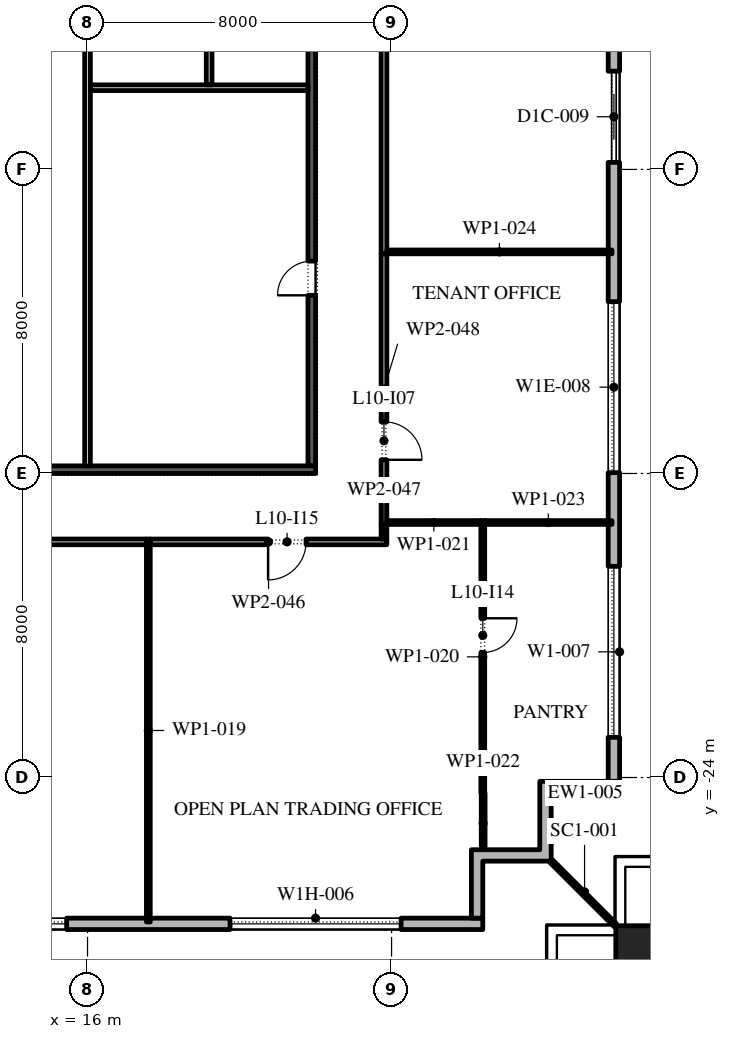
"""IFC4 building model, lengths in metres.
Left out: names, types, materials, properties, quantities, classifications, styles, units other than length and angle.
Written with IfcOpenShell. Run it as: python <this file> out.ifc"""

import sys

from ifc_helpers import new_model, si_unit, direction, frame, frame_2d, origin, origin_2d, place, context, subcontext, project, spatial, polyline, rectangle, outline, extrude, element, fill, save


model = new_model("IFC4")
c1 = context("Model", 3, precision=1e-05, world=origin(), true_north=direction((0.0, 1.0)))
c2 = subcontext(c1, "Body", "Model", "MODEL_VIEW")
j1 = project(units=[si_unit("LENGTHUNIT", "METRE"), si_unit("PLANEANGLEUNIT", "RADIAN")], contexts=[c1])
p1 = place(None, origin())
s1 = spatial("IfcSite", under=j1, at=p1, CompositionType="ELEMENT")
p2 = place(p1, origin())
s2 = spatial("IfcBuilding", under=s1, at=p2, CompositionType="ELEMENT")
p3 = place(p2, frame((0.0, 0.0, 52.2)))
s3 = spatial("IfcBuildingStorey", under=s2, at=p3, CompositionType="ELEMENT", Elevation=52.2)
p4 = place(p3, frame((30.6, -28.6, 0.0), z_axis=(0.0, 0.0, 1.0), x_axis=(1.0, 0.0, 0.0)))
e1 = element("IfcColumn", 1, at=p4, inside=s3, PredefinedType="COLUMN", context=c2, shape_type="SweptSolid", body=[
    extrude(rectangle(XDim=1.4, YDim=1.4, at=origin_2d()), origin(), (0.0, 0.0, 1.0), 4.2),
])
p5 = place(p3, frame((-26.1, -27.85, 0.0), z_axis=(0.0, 0.0, 1.0), x_axis=(1.0, 0.0, 0.0)))
e2 = element("IfcWall", 2, at=p5, inside=s3, PredefinedType="STANDARD", context=c2, shape_type="SweptSolid", body=[
    extrude(rectangle(XDim=52.5, YDim=0.3, at=frame_2d((26.25, 0.0))), origin(), (0.0, 0.0, 1.0), 4.0),
])
p6 = place(p5, frame((2.0, 0.0, 0.45)))
e3 = element("IfcOpeningElement", 3, at=p6, cuts=e2, PredefinedType="OPENING", context=c2, shape_type="SweptSolid", body=[
    extrude(rectangle(XDim=4.5, YDim=2.75, at=frame_2d((2.25, 1.375))), frame((0.0, 0.16, 0.0), z_axis=(0.0, -1.0, 0.0), x_axis=(1.0, 0.0, 0.0)), (0.0, 0.0, 1.0), 0.32),
])
p7 = place(p5, frame((10.65, 0.0, 0.45)))
e4 = element("IfcOpeningElement", 4, at=p7, cuts=e2, PredefinedType="OPENING", context=c2, shape_type="SweptSolid", body=[
    extrude(rectangle(XDim=4.5, YDim=2.75, at=frame_2d((2.25, 1.375))), frame((0.0, 0.16, 0.0), z_axis=(0.0, -1.0, 0.0), x_axis=(1.0, 0.0, 0.0)), (0.0, 0.0, 1.0), 0.32),
])
p8 = place(p5, frame((20.5, 0.0, 0.0)))
e5 = element("IfcOpeningElement", 5, at=p8, cuts=e2, PredefinedType="OPENING", context=c2, shape_type="SweptSolid", body=[
    extrude(rectangle(XDim=2.4, YDim=3.5, at=frame_2d((1.2, 1.75))), frame((0.0, 0.16, 0.0), z_axis=(0.0, -1.0, 0.0), x_axis=(1.0, 0.0, 0.0)), (0.0, 0.0, 1.0), 0.32),
])
p9 = place(p5, frame((28.25, 0.0, 0.45)))
e6 = element("IfcOpeningElement", 6, at=p9, cuts=e2, PredefinedType="OPENING", context=c2, shape_type="SweptSolid", body=[
    extrude(rectangle(XDim=4.5, YDim=2.75, at=frame_2d((2.25, 1.375))), frame((0.0, 0.16, 0.0), z_axis=(0.0, -1.0, 0.0), x_axis=(1.0, 0.0, 0.0)), (0.0, 0.0, 1.0), 0.32),
])
p10 = place(p5, frame((37.05, 0.0, 0.45)))
e7 = element("IfcOpeningElement", 7, at=p10, cuts=e2, PredefinedType="OPENING", context=c2, shape_type="SweptSolid", body=[
    extrude(rectangle(XDim=4.5, YDim=2.75, at=frame_2d((2.25, 1.375))), frame((0.0, 0.16, 0.0), z_axis=(0.0, -1.0, 0.0), x_axis=(1.0, 0.0, 0.0)), (0.0, 0.0, 1.0), 0.32),
])
p11 = place(p5, frame((45.85, 0.0, 0.45)))
e8 = element("IfcOpeningElement", 8, at=p11, cuts=e2, PredefinedType="OPENING", context=c2, shape_type="SweptSolid", body=[
    extrude(rectangle(XDim=4.5, YDim=2.75, at=frame_2d((2.25, 1.375))), frame((0.0, 0.16, 0.0), z_axis=(0.0, -1.0, 0.0), x_axis=(1.0, 0.0, 0.0)), (0.0, 0.0, 1.0), 0.32),
])
p12 = place(p3, frame((29.85, -24.1, 0.0), z_axis=(0.0, 0.0, 1.0), x_axis=(0.0, 1.0, 0.0)))
e9 = element("IfcWall", 9, at=p12, inside=s3, PredefinedType="STANDARD", context=c2, shape_type="SweptSolid", body=[
    extrude(rectangle(XDim=49.5, YDim=0.3, at=frame_2d((24.75, 0.0))), origin(), (0.0, 0.0, 1.0), 4.0),
])
p13 = place(p12, frame((1.157, 0.0, 0.45)))
e10 = element("IfcOpeningElement", 10, at=p13, cuts=e9, PredefinedType="OPENING", context=c2, shape_type="SweptSolid", body=[
    extrude(rectangle(XDim=4.5, YDim=3.05, at=frame_2d((2.25, 1.525))), frame((0.0, 0.16, 0.0), z_axis=(0.0, -1.0, 0.0), x_axis=(1.0, 0.0, 0.0)), (0.0, 0.0, 1.0), 0.32),
])
p14 = place(p12, frame((8.121, 0.0, 0.45)))
e11 = element("IfcOpeningElement", 11, at=p14, cuts=e9, PredefinedType="OPENING", context=c2, shape_type="SweptSolid", body=[
    extrude(rectangle(XDim=4.5, YDim=2.825, at=frame_2d((2.25, 1.413))), frame((0.0, 0.16, 0.0), z_axis=(0.0, -1.0, 0.0), x_axis=(1.0, 0.0, 0.0)), (0.0, 0.0, 1.0), 0.32),
])
p15 = place(p12, frame((16.286, 0.0, 0.0)))
e12 = element("IfcOpeningElement", 12, at=p15, cuts=e9, PredefinedType="OPENING", context=c2, shape_type="SweptSolid", body=[
    extrude(rectangle(XDim=2.4, YDim=3.325, at=frame_2d((1.2, 1.663))), frame((0.0, 0.16, 0.0), z_axis=(0.0, -1.0, 0.0), x_axis=(1.0, 0.0, 0.0)), (0.0, 0.0, 1.0), 0.32),
])
p16 = place(p12, frame((22.35, 0.0, 0.45)))
e13 = element("IfcOpeningElement", 13, at=p16, cuts=e9, PredefinedType="OPENING", context=c2, shape_type="SweptSolid", body=[
    extrude(rectangle(XDim=4.5, YDim=2.875, at=frame_2d((2.25, 1.438))), frame((0.0, 0.16, 0.0), z_axis=(0.0, -1.0, 0.0), x_axis=(1.0, 0.0, 0.0)), (0.0, 0.0, 1.0), 0.32),
])
p17 = place(p12, frame((29.464, 0.0, 0.45)))
e14 = element("IfcOpeningElement", 14, at=p17, cuts=e9, PredefinedType="OPENING", context=c2, shape_type="SweptSolid", body=[
    extrude(rectangle(XDim=4.5, YDim=2.875, at=frame_2d((2.25, 1.438))), frame((0.0, 0.16, 0.0), z_axis=(0.0, -1.0, 0.0), x_axis=(1.0, 0.0, 0.0)), (0.0, 0.0, 1.0), 0.32),
])
p18 = place(p12, frame((36.579, 0.0, 0.45)))
e15 = element("IfcOpeningElement", 15, at=p18, cuts=e9, PredefinedType="OPENING", context=c2, shape_type="SweptSolid", body=[
    extrude(rectangle(XDim=4.5, YDim=3.05, at=frame_2d((2.25, 1.525))), frame((0.0, 0.16, 0.0), z_axis=(0.0, -1.0, 0.0), x_axis=(1.0, 0.0, 0.0)), (0.0, 0.0, 1.0), 0.32),
])
p19 = place(p12, frame((44.743, 0.0, 0.0)))
e16 = element("IfcOpeningElement", 16, at=p19, cuts=e9, PredefinedType="OPENING", context=c2, shape_type="SweptSolid", body=[
    extrude(rectangle(XDim=2.4, YDim=3.325, at=frame_2d((1.2, 1.663))), frame((0.0, 0.16, 0.0), z_axis=(0.0, -1.0, 0.0), x_axis=(1.0, 0.0, 0.0)), (0.0, 0.0, 1.0), 0.32),
])
p20 = place(p3, origin())
e17 = element("IfcWall", 17, at=p20, inside=s3, PredefinedType="STANDARD", context=c2, shape_type="SweptSolid", body=[
    extrude(outline(polyline([(27.9, -25.9), (27.9, -24.1), (30.0, -24.1), (30.0, -24.4), (28.2, -24.4), (28.2, -26.2), (26.4, -26.2), (26.4, -27.7), (26.1, -27.7), (26.1, -25.9), (27.9, -25.9)])), origin(), (0.0, 0.0, 1.0), 4.0),
])
p21 = place(p3, frame((28.2, -26.2, -0.05), z_axis=(0.0, 0.0, 1.0), x_axis=(0.707106781187, -0.707106781187, 0.0)))
e18 = element("IfcWall", 18, at=p21, inside=s3, PredefinedType="STANDARD", context=c2, shape_type="SweptSolid", body=[
    extrude(rectangle(XDim=2.385, YDim=0.1, at=frame_2d((1.192, 0.0))), origin(), (0.0, 0.0, 1.0), 4.05),
])
p22 = place(p3, frame((21.9, -15.8, 0.0), z_axis=(0.0, 0.0, 1.0), x_axis=(0.0, 1.0, 0.0)))
e19 = element("IfcWall", 19, at=p22, inside=s3, PredefinedType="SHEAR", context=c2, shape_type="SweptSolid", body=[
    extrude(rectangle(XDim=13.05, YDim=0.2, at=frame_2d((6.525, 0.0))), origin(), (0.0, 0.0, 1.0), 4.0),
])
p23 = place(p22, frame((4.488, 0.0, 0.0)))
e20 = element("IfcOpeningElement", 20, at=p23, cuts=e19, PredefinedType="OPENING", context=c2, shape_type="SweptSolid", body=[
    extrude(rectangle(XDim=0.9, YDim=2.1, at=frame_2d((0.45, 1.05))), frame((0.0, 0.11, 0.0), z_axis=(0.0, -1.0, 0.0), x_axis=(1.0, 0.0, 0.0)), (0.0, 0.0, 1.0), 0.22),
])
p24 = place(p22, frame((11.038, 0.0, 0.0)))
e21 = element("IfcOpeningElement", 21, at=p24, cuts=e19, PredefinedType="OPENING", context=c2, shape_type="SweptSolid", body=[
    extrude(rectangle(XDim=1.0, YDim=2.1, at=frame_2d((0.5, 1.05))), frame((0.0, 0.11, 0.0), z_axis=(0.0, -1.0, 0.0), x_axis=(1.0, 0.0, 0.0)), (0.0, 0.0, 1.0), 0.22),
])
p25 = place(p3, frame((10.0, -15.9, 0.0), z_axis=(0.0, 0.0, 1.0), x_axis=(1.0, 0.0, 0.0)))
e22 = element("IfcWall", 22, at=p25, inside=s3, PredefinedType="SHEAR", context=c2, shape_type="SweptSolid", body=[
    extrude(rectangle(XDim=12.0, YDim=0.2, at=frame_2d((6.0, 0.0))), origin(), (0.0, 0.0, 1.0), 4.0),
])
p26 = place(p3, frame((16.0, -15.8, 0.0), z_axis=(0.0, 0.0, 1.0), x_axis=(0.0, 1.0, 0.0)))
e23 = element("IfcWall", 23, at=p26, inside=s3, PredefinedType="PARTITIONING", context=c2, shape_type="SweptSolid", body=[
    extrude(rectangle(XDim=13.05, YDim=0.15, at=frame_2d((6.525, 0.0))), origin(), (0.0, 0.0, 1.0), 4.0),
])
p27 = place(p26, frame((11.087, 0.0, 0.0)))
e24 = element("IfcOpeningElement", 24, at=p27, cuts=e23, PredefinedType="OPENING", context=c2, shape_type="SweptSolid", body=[
    extrude(rectangle(XDim=0.9, YDim=2.1, at=frame_2d((0.45, 1.05))), frame((0.0, 0.085, 0.0), z_axis=(0.0, -1.0, 0.0), x_axis=(1.0, 0.0, 0.0)), (0.0, 0.0, 1.0), 0.17),
])
p28 = place(p3, frame((16.075, -5.85, 0.0), z_axis=(0.0, 0.0, 1.0), x_axis=(1.0, 0.0, 0.0)))
e25 = element("IfcWall", 25, at=p28, inside=s3, PredefinedType="PARTITIONING", context=c2, shape_type="SweptSolid", body=[
    extrude(rectangle(XDim=5.725, YDim=0.15, at=frame_2d((2.863, 0.0))), origin(), (0.0, 0.0, 1.0), 4.0),
])
p29 = place(p3, frame((19.2, -5.775, 0.0), z_axis=(0.0, 0.0, 1.0), x_axis=(0.0, 1.0, 0.0)))
e26 = element("IfcWall", 26, at=p29, inside=s3, PredefinedType="PARTITIONING", context=c2, shape_type="SweptSolid", body=[
    extrude(rectangle(XDim=3.025, YDim=0.15, at=frame_2d((1.512, 0.0))), origin(), (0.0, 0.0, 1.0), 4.0),
])
p30 = place(p3, frame((17.6, -27.8, 0.0), z_axis=(0.0, 0.0, 1.0), x_axis=(0.0, 1.0, 0.0)))
e27 = element("IfcWall", 27, at=p30, inside=s3, PredefinedType="PARTITIONING", context=c2, shape_type="SweptSolid", body=[
    extrude(rectangle(XDim=10.075, YDim=0.1, at=frame_2d((5.038, 0.0))), origin(), (0.0, 0.0, 1.0), 4.0),
])
p31 = place(p3, frame((17.55, -17.8, 0.0), z_axis=(0.0, 0.0, 1.0), x_axis=(-1.0, 0.0, 0.0)))
e28 = element("IfcWall", 28, at=p31, inside=s3, PredefinedType="PARTITIONING", context=c2, shape_type="SweptSolid", body=[
    extrude(rectangle(XDim=8.7, YDim=0.15, at=frame_2d((4.35, 0.0))), origin(), (0.0, 0.0, 1.0), 4.0),
])
p32 = place(p31, frame((4.85, 0.0, 0.0)))
e29 = element("IfcOpeningElement", 29, at=p32, cuts=e28, PredefinedType="OPENING", context=c2, shape_type="SweptSolid", body=[
    extrude(rectangle(XDim=1.0, YDim=2.1, at=frame_2d((0.5, 1.05))), frame((0.0, 0.085, 0.0), z_axis=(0.0, -1.0, 0.0), x_axis=(1.0, 0.0, 0.0)), (0.0, 0.0, 1.0), 0.17),
])
p33 = place(p3, frame((23.875, -17.8, 0.0), z_axis=(0.0, 0.0, 1.0), x_axis=(-1.0, 0.0, 0.0)))
e30 = element("IfcWall", 30, at=p33, inside=s3, PredefinedType="PARTITIONING", context=c2, shape_type="SweptSolid", body=[
    extrude(rectangle(XDim=6.225, YDim=0.15, at=frame_2d((3.113, 0.0))), origin(), (0.0, 0.0, 1.0), 4.0),
])
p34 = place(p33, frame((2.125, 0.0, 0.0)))
e31 = element("IfcOpeningElement", 31, at=p34, cuts=e30, PredefinedType="OPENING", context=c2, shape_type="SweptSolid", body=[
    extrude(rectangle(XDim=1.0, YDim=2.1, at=frame_2d((0.5, 1.05))), frame((0.0, 0.085, 0.0), z_axis=(0.0, -1.0, 0.0), x_axis=(1.0, 0.0, 0.0)), (0.0, 0.0, 1.0), 0.17),
])
p35 = place(p3, frame((23.8, -17.34, 0.0), z_axis=(0.0, 0.0, 1.0), x_axis=(0.0, -1.0, 0.0)))
e32 = element("IfcWall", 32, at=p35, inside=s3, PredefinedType="PARTITIONING", context=c2, shape_type="SweptSolid", body=[
    extrude(rectangle(XDim=0.385, YDim=0.15, at=frame_2d((0.192, 0.0))), origin(), (0.0, 0.0, 1.0), 4.0),
])
p36 = place(p3, frame((23.8, -10.22, 0.0), z_axis=(0.0, 0.0, 1.0), x_axis=(0.0, -1.0, 0.0)))
e33 = element("IfcWall", 33, at=p36, inside=s3, PredefinedType="PARTITIONING", context=c2, shape_type="SweptSolid", body=[
    extrude(rectangle(XDim=7.12, YDim=0.15, at=frame_2d((3.56, 0.0))), origin(), (0.0, 0.0, 1.0), 4.0),
])
p37 = place(p36, frame((4.42, 0.0, 0.0)))
e34 = element("IfcOpeningElement", 34, at=p37, cuts=e33, PredefinedType="OPENING", context=c2, shape_type="SweptSolid", body=[
    extrude(rectangle(XDim=1.0, YDim=2.1, at=frame_2d((0.5, 1.05))), frame((0.0, 0.085, 0.0), z_axis=(0.0, -1.0, 0.0), x_axis=(1.0, 0.0, 0.0)), (0.0, 0.0, 1.0), 0.17),
])
p38 = place(p3, frame((23.8, 4.11, 0.0), z_axis=(0.0, 0.0, 1.0), x_axis=(0.0, -1.0, 0.0)))
e35 = element("IfcWall", 35, at=p38, inside=s3, PredefinedType="PARTITIONING", context=c2, shape_type="SweptSolid", body=[
    extrude(rectangle(XDim=14.33, YDim=0.15, at=frame_2d((7.165, 0.0))), origin(), (0.0, 0.0, 1.0), 4.0),
])
p39 = place(p38, frame((6.63, 0.0, 0.0)))
e36 = element("IfcOpeningElement", 36, at=p39, cuts=e35, PredefinedType="OPENING", context=c2, shape_type="SweptSolid", body=[
    extrude(rectangle(XDim=1.0, YDim=2.1, at=frame_2d((0.5, 1.05))), frame((0.0, 0.085, 0.0), z_axis=(0.0, -1.0, 0.0), x_axis=(1.0, 0.0, 0.0)), (0.0, 0.0, 1.0), 0.17),
])
p40 = place(p3, frame((26.4, -24.41, 0.0), z_axis=(0.0, 0.0, 1.0), x_axis=(0.0, 1.0, 0.0)))
e37 = element("IfcWall", 37, at=p40, inside=s3, PredefinedType="PARTITIONING", context=c2, shape_type="SweptSolid", body=[
    extrude(rectangle(XDim=7.17, YDim=0.1, at=frame_2d((3.585, 0.0))), origin(), (0.0, 0.0, 1.0), 4.0),
])
p41 = place(p40, frame((3.7, 0.0, 0.0)))
e38 = element("IfcOpeningElement", 38, at=p41, cuts=e37, PredefinedType="OPENING", context=c2, shape_type="SweptSolid", body=[
    extrude(rectangle(XDim=0.9, YDim=2.1, at=frame_2d((0.45, 1.05))), frame((0.0, 0.06, 0.0), z_axis=(0.0, -1.0, 0.0), x_axis=(1.0, 0.0, 0.0)), (0.0, 0.0, 1.0), 0.12),
])
p42 = place(p3, frame((26.35, -17.29, 0.0), z_axis=(0.0, 0.0, 1.0), x_axis=(-1.0, 0.0, 0.0)))
e39 = element("IfcWall", 39, at=p42, inside=s3, PredefinedType="PARTITIONING", context=c2, shape_type="SweptSolid", body=[
    extrude(rectangle(XDim=2.475, YDim=0.1, at=frame_2d((1.238, 0.0))), origin(), (0.0, 0.0, 1.0), 4.0),
])
p43 = place(p3, frame((26.41, -26.0, 0.0), z_axis=(0.0, 0.0, 1.0), x_axis=(0.0, 1.0, 0.0)))
e40 = element("IfcWall", 40, at=p43, inside=s3, PredefinedType="PARTITIONING", context=c2, shape_type="SweptSolid", body=[
    extrude(rectangle(XDim=1.59, YDim=0.1, at=frame_2d((0.795, 0.0))), origin(), (0.0, 0.0, 1.0), 4.0),
])
p44 = place(p3, frame((29.8, -17.29, 0.0), z_axis=(0.0, 0.0, 1.0), x_axis=(-1.0, 0.0, 0.0)))
e41 = element("IfcWall", 41, at=p44, inside=s3, PredefinedType="PARTITIONING", context=c2, shape_type="SweptSolid", body=[
    extrude(rectangle(XDim=3.35, YDim=0.1, at=frame_2d((1.675, 0.0))), origin(), (0.0, 0.0, 1.0), 4.0),
])
p45 = place(p3, frame((29.8, -10.17, 0.0), z_axis=(0.0, 0.0, 1.0), x_axis=(-1.0, 0.0, 0.0)))
e42 = element("IfcWall", 42, at=p45, inside=s3, PredefinedType="PARTITIONING", context=c2, shape_type="SweptSolid", body=[
    extrude(rectangle(XDim=5.925, YDim=0.1, at=frame_2d((2.962, 0.0))), origin(), (0.0, 0.0, 1.0), 4.0),
])
p46 = place(p10, origin())
e43 = element("IfcWindow", 43, at=p46, inside=s3, PartitioningType="DOUBLE_PANEL_VERTICAL", PredefinedType="WINDOW", context=c2, shape_type="SweptSolid", body=[
    extrude(rectangle(XDim=4.5, YDim=2.75, at=frame_2d((2.25, 1.375))), frame((0.0, 0.03, 0.0), z_axis=(0.0, -1.0, 0.0), x_axis=(1.0, 0.0, 0.0)), (0.0, 0.0, 1.0), 0.06),
])
fill(e7, e43)
p47 = place(p11, origin())
e44 = element("IfcWindow", 44, at=p47, inside=s3, PartitioningType="DOUBLE_PANEL_VERTICAL", PredefinedType="WINDOW", context=c2, shape_type="SweptSolid", body=[
    extrude(rectangle(XDim=4.5, YDim=2.75, at=frame_2d((2.25, 1.375))), frame((0.0, 0.03, 0.0), z_axis=(0.0, -1.0, 0.0), x_axis=(1.0, 0.0, 0.0)), (0.0, 0.0, 1.0), 0.06),
])
fill(e8, e44)
p48 = place(p13, origin())
e45 = element("IfcWindow", 45, at=p48, inside=s3, PartitioningType="DOUBLE_PANEL_VERTICAL", PredefinedType="WINDOW", context=c2, shape_type="SweptSolid", body=[
    extrude(rectangle(XDim=4.5, YDim=3.05, at=frame_2d((2.25, 1.525))), frame((0.0, 0.03, 0.0), z_axis=(0.0, -1.0, 0.0), x_axis=(1.0, 0.0, 0.0)), (0.0, 0.0, 1.0), 0.06),
])
fill(e10, e45)
p49 = place(p14, origin())
e46 = element("IfcWindow", 46, at=p49, inside=s3, PartitioningType="DOUBLE_PANEL_VERTICAL", PredefinedType="WINDOW", context=c2, shape_type="SweptSolid", body=[
    extrude(rectangle(XDim=4.5, YDim=2.825, at=frame_2d((2.25, 1.413))), frame((0.0, 0.03, 0.0), z_axis=(0.0, -1.0, 0.0), x_axis=(1.0, 0.0, 0.0)), (0.0, 0.0, 1.0), 0.06),
])
fill(e11, e46)
p50 = place(p15, origin())
e47 = element("IfcDoor", 47, at=p50, inside=s3, OperationType="DOUBLE_DOOR_SLIDING", PredefinedType="DOOR", context=c2, shape_type="SweptSolid", body=[
    extrude(rectangle(XDim=2.4, YDim=3.325, at=frame_2d((1.2, 1.663))), frame((0.0, 0.025, 0.0), z_axis=(0.0, -1.0, 0.0), x_axis=(1.0, 0.0, 0.0)), (0.0, 0.0, 1.0), 0.05),
])
fill(e12, e47)
p51 = place(p23, origin())
e48 = element("IfcDoor", 48, at=p51, inside=s3, OperationType="SINGLE_SWING_RIGHT", PredefinedType="DOOR", context=c2, shape_type="SweptSolid", body=[
    extrude(rectangle(XDim=0.9, YDim=2.1, at=frame_2d((0.45, 1.05))), frame((0.0, 0.1, 0.0), z_axis=(0.0, -1.0, 0.0), x_axis=(1.0, 0.0, 0.0)), (0.0, 0.0, 1.0), 0.05),
])
fill(e20, e48)
p52 = place(p37, origin())
e49 = element("IfcDoor", 49, at=p52, inside=s3, OperationType="SINGLE_SWING_LEFT", PredefinedType="DOOR", context=c2, shape_type="SweptSolid", body=[
    extrude(rectangle(XDim=1.0, YDim=2.1, at=frame_2d((0.5, 1.05))), frame((0.0, 0.025, 0.0), z_axis=(0.0, -1.0, 0.0), x_axis=(1.0, 0.0, 0.0)), (0.0, 0.0, 1.0), 0.05),
])
fill(e34, e49)
p53 = place(p41, frame((0.9, 0.0, 0.0), z_axis=(0.0, 0.0, 1.0), x_axis=(-1.0, 0.0, 0.0)))
e50 = element("IfcDoor", 50, at=p53, inside=s3, OperationType="SINGLE_SWING_RIGHT", PredefinedType="DOOR", context=c2, shape_type="SweptSolid", body=[
    extrude(rectangle(XDim=0.9, YDim=2.1, at=frame_2d((0.45, 1.05))), frame((0.0, 0.025, 0.0), z_axis=(0.0, -1.0, 0.0), x_axis=(1.0, 0.0, 0.0)), (0.0, 0.0, 1.0), 0.05),
])
fill(e38, e50)
p54 = place(p34, origin())
e51 = element("IfcDoor", 51, at=p54, inside=s3, OperationType="SINGLE_SWING_LEFT", PredefinedType="DOOR", context=c2, shape_type="SweptSolid", body=[
    extrude(rectangle(XDim=1.0, YDim=2.1, at=frame_2d((0.5, 1.05))), frame((0.0, 0.025, 0.0), z_axis=(0.0, -1.0, 0.0), x_axis=(1.0, 0.0, 0.0)), (0.0, 0.0, 1.0), 0.05),
])
fill(e31, e51)
save(model, sys.argv[1])
